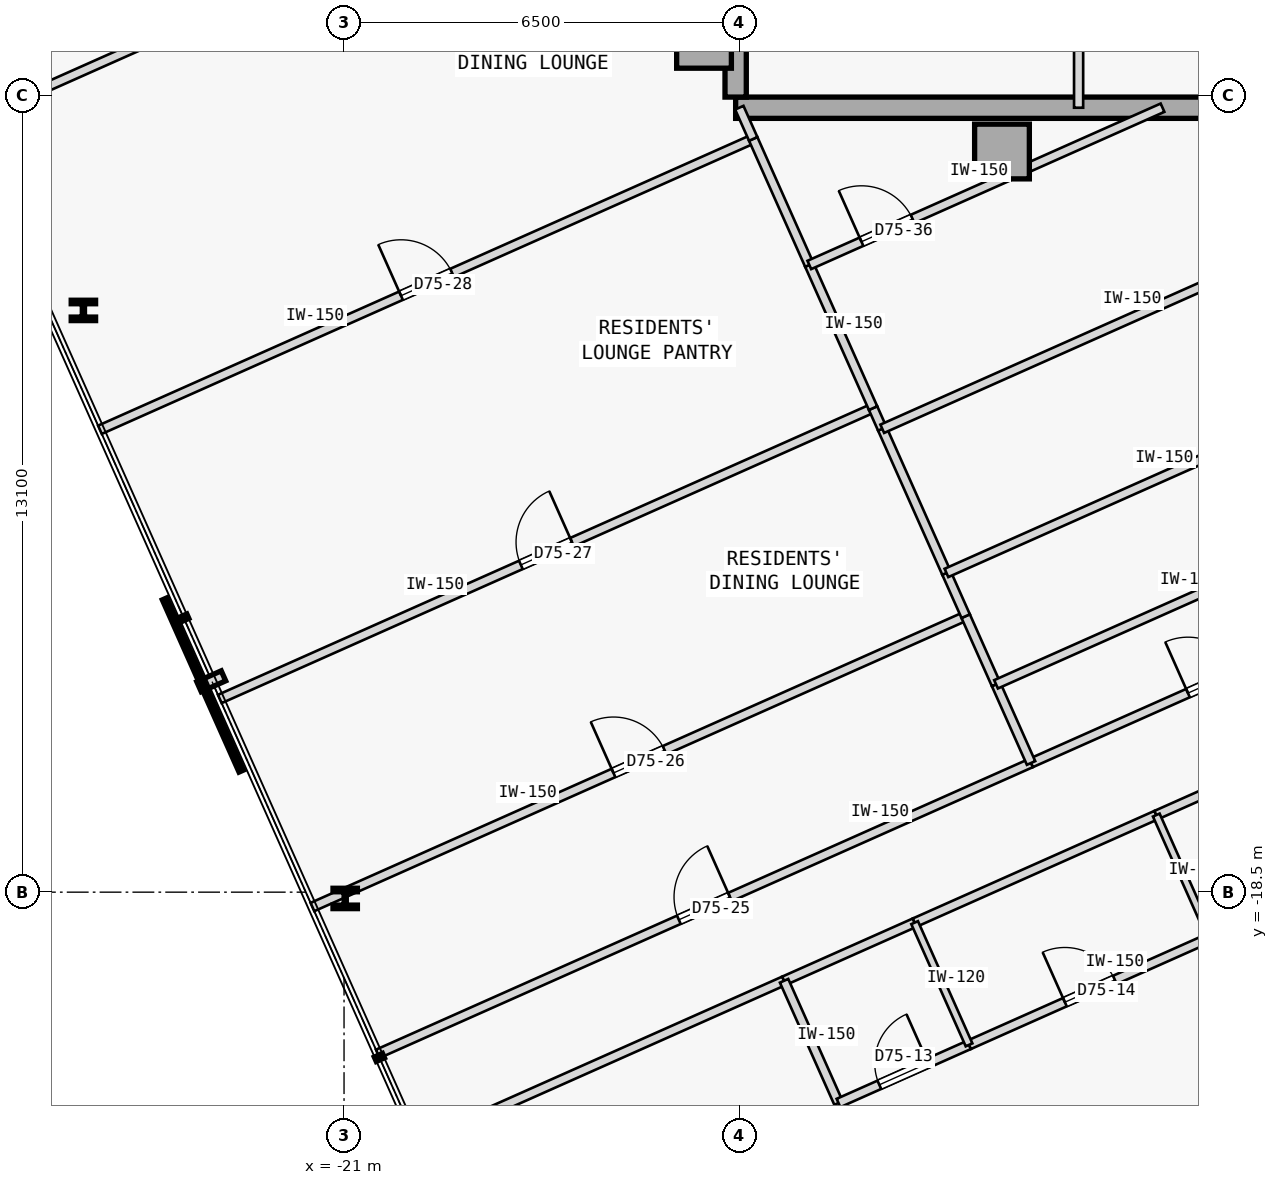
"""IFC4 building model, lengths in metres.
Left out: names, types, materials, properties, quantities, classifications, styles, units other than length and angle.
Written with IfcOpenShell. Run it as: python <this file> out.ifc"""

import sys

from ifc_helpers import new_model, si_unit, direction, frame, frame_2d, origin, origin_2d, place, context, subcontext, project, spatial, rectangle, i_section, extrude, element, fill, save


model = new_model("IFC4")
c1 = context("Model", 3, precision=1e-05, world=origin(), true_north=direction((0.0, 1.0)))
c2 = subcontext(c1, "Body", "Model", "MODEL_VIEW")
j1 = project(units=[si_unit("LENGTHUNIT", "METRE"), si_unit("PLANEANGLEUNIT", "RADIAN")], contexts=[c1])
p1 = place(None, origin())
s1 = spatial("IfcSite", under=j1, at=p1, CompositionType="ELEMENT")
p2 = place(p1, origin())
s2 = spatial("IfcBuilding", under=s1, at=p2, CompositionType="ELEMENT")
p3 = place(p2, frame((0.0, 0.0, 281.9)))
s3 = spatial("IfcBuildingStorey", under=s2, at=p3, CompositionType="ELEMENT", Elevation=281.9)
for number, where, z_axis, x_axis in (
    (1, (-15.08, -4.5, 0.0), (0.0, 0.0, 1.0), (1.0, 0.0, 0.0)),
    (2, (-10.18, -6.32, 0.0), (0.0, 0.0, 1.0), (1.0, 0.0, 0.0)),
):
    element("IfcColumn", number, at=place(p3, frame(where, z_axis=z_axis, x_axis=x_axis)), inside=s3, PredefinedType="COLUMN", context=c2, shape_type="SweptSolid", body=[
        extrude(rectangle(XDim=0.9, YDim=0.9, at=origin_2d()), origin(), (0.0, 0.0, 1.0), 3.35),
    ])
p4 = place(p3, frame((-14.56, -5.6, 0.0), z_axis=(0.0, 0.0, 1.0), x_axis=(1.0, 0.0, 0.0)))
e3 = element("IfcWall", 3, at=p4, inside=s3, PredefinedType="SHEAR", context=c2, shape_type="SweptSolid", body=[
    extrude(rectangle(XDim=10.86, YDim=0.35, at=frame_2d((5.43, 0.0))), origin(), (0.0, 0.0, 1.0), 3.125),
])
p5 = place(p3, frame((-14.56, -5.425, 0.0), z_axis=(0.0, 0.0, 1.0), x_axis=(0.0, 1.0, 0.0)))
e4 = element("IfcWall", 4, at=p5, inside=s3, PredefinedType="SHEAR", context=c2, shape_type="SweptSolid", body=[
    extrude(rectangle(XDim=10.85, YDim=0.35, at=frame_2d((5.425, 0.0))), origin(), (0.0, 0.0, 1.0), 3.125),
])
for number, where, z_axis, x_axis in (
    (5, (-25.286, -8.933, 0.0), (0.0, 0.0, 1.0), (1.0, 0.0, 0.0)),
    (6, (-20.981, -18.603, 0.0), (0.0, 0.0, 1.0), (1.0, 0.0, 0.0)),
):
    element("IfcColumn", number, at=place(p3, frame(where, z_axis=z_axis, x_axis=x_axis)), inside=s3, PredefinedType="COLUMN", context=c2, shape_type="SweptSolid", body=[
        extrude(i_section(OverallWidth=0.401, OverallDepth=0.335, WebThickness=0.036, FlangeThickness=0.058, FilletRadius=0.015, at=origin_2d()), origin(), (0.0, 0.0, 1.0), 3.35),
    ])
p6 = place(p3, frame((-8.92, -5.6, 0.0), z_axis=(0.0, 0.0, 1.0), x_axis=(0.0, 1.0, 0.0)))
e7 = element("IfcWall", 7, at=p6, inside=s3, PredefinedType="PARTITIONING", context=c2, shape_type="SweptSolid", body=[
    extrude(rectangle(XDim=2.65, YDim=0.15, at=frame_2d((1.325, 0.0))), origin(), (0.0, 0.0, 1.0), 3.125),
])
p7 = place(p3, frame((-19.786, -22.639, 0.0), z_axis=(0.0, 0.0, 1.0), x_axis=(0.913548717067, 0.406729322211, 0.0)))
e8 = element("IfcWall", 8, at=p7, inside=s3, PredefinedType="PARTITIONING", context=c2, shape_type="SweptSolid", body=[
    extrude(rectangle(XDim=6.593, YDim=0.15, at=frame_2d((3.297, 0.0))), origin(), (0.0, 0.0, 1.0), 3.125),
])
p8 = place(p3, frame((-13.763, -19.957, 0.0), z_axis=(0.0, 0.0, 1.0), x_axis=(0.913541436194, 0.406745675276, 0.0)))
e9 = element("IfcWall", 9, at=p8, inside=s3, PredefinedType="PARTITIONING", context=c2, shape_type="SweptSolid", body=[
    extrude(rectangle(XDim=2.35, YDim=0.15, at=frame_2d((1.175, 0.0))), origin(), (0.0, 0.0, 1.0), 3.125),
])
p9 = place(p3, frame((-11.616, -19.001, 0.0), z_axis=(0.0, 0.0, 1.0), x_axis=(0.913545193015, 0.406737237438, 0.0)))
e10 = element("IfcWall", 10, at=p9, inside=s3, PredefinedType="PARTITIONING", context=c2, shape_type="SweptSolid", body=[
    extrude(rectangle(XDim=4.35, YDim=0.15, at=frame_2d((2.175, 0.0))), origin(), (0.0, 0.0, 1.0), 3.125),
])
p10 = place(p3, frame((-7.643, -17.232, 0.0), z_axis=(0.0, 0.0, 1.0), x_axis=(0.913549606868, 0.406727323635, 0.0)))
e11 = element("IfcWall", 11, at=p10, inside=s3, PredefinedType="PARTITIONING", context=c2, shape_type="SweptSolid", body=[
    extrude(rectangle(XDim=3.5, YDim=0.15, at=frame_2d((1.75, 0.0))), origin(), (0.0, 0.0, 1.0), 3.125),
])
p11 = place(p3, frame((-20.445, -21.159, 0.0), z_axis=(0.0, 0.0, 1.0), x_axis=(0.913547681516, 0.406731648137, 0.0)))
e12 = element("IfcWall", 12, at=p11, inside=s3, PredefinedType="PARTITIONING", context=c2, shape_type="SweptSolid", body=[
    extrude(rectangle(XDim=11.76, YDim=0.15, at=frame_2d((5.88, 0.0))), origin(), (0.0, 0.0, 1.0), 3.125),
])
p12 = place(p11, frame((5.42, 0.0, 0.0)))
e13 = element("IfcOpeningElement", 13, at=p12, cuts=e12, PredefinedType="OPENING", context=c2, shape_type="SweptSolid", body=[
    extrude(rectangle(XDim=0.92, YDim=2.15, at=frame_2d((0.46, 1.075))), frame((0.0, 0.085, 0.0), z_axis=(0.0, -1.0, 0.0), x_axis=(1.0, 0.0, 0.0)), (0.0, 0.0, 1.0), 0.17),
])
p13 = place(p3, frame((-9.702, -16.375, 0.0), z_axis=(0.0, 0.0, 1.0), x_axis=(0.913552389019, 0.406721074594, 0.0)))
e14 = element("IfcWall", 14, at=p13, inside=s3, PredefinedType="PARTITIONING", context=c2, shape_type="SweptSolid", body=[
    extrude(rectangle(XDim=6.57, YDim=0.15, at=frame_2d((3.285, 0.0))), origin(), (0.0, 0.0, 1.0), 3.125),
])
p14 = place(p13, frame((2.825, 0.0, 0.0)))
e15 = element("IfcOpeningElement", 15, at=p14, cuts=e14, PredefinedType="OPENING", context=c2, shape_type="SweptSolid", body=[
    extrude(rectangle(XDim=0.92, YDim=2.15, at=frame_2d((0.46, 1.075))), frame((0.0, 0.085, 0.0), z_axis=(0.0, -1.0, 0.0), x_axis=(1.0, 0.0, 0.0)), (0.0, 0.0, 1.0), 0.17),
])
p15 = place(p3, frame((-12.868, -21.967, 0.0), z_axis=(0.0, 0.0, 1.0), x_axis=(-0.406725294076, 0.913550510459, 0.0)))
e16 = element("IfcWall", 16, at=p15, inside=s3, PredefinedType="PARTITIONING", context=c2, shape_type="SweptSolid", body=[
    extrude(rectangle(XDim=2.2, YDim=0.15, at=frame_2d((1.1, 0.0))), origin(), (0.0, 0.0, 1.0), 3.125),
])
p16 = place(p3, frame((-12.868, -21.967, 0.0), z_axis=(0.0, 0.0, 1.0), x_axis=(0.913541436194, 0.406745675276, 0.0)))
e17 = element("IfcWall", 17, at=p16, inside=s3, PredefinedType="PARTITIONING", context=c2, shape_type="SweptSolid", body=[
    extrude(rectangle(XDim=2.35, YDim=0.15, at=frame_2d((1.175, 0.0))), origin(), (0.0, 0.0, 1.0), 3.125),
])
p17 = place(p16, frame((0.735, 0.0, 0.0)))
e18 = element("IfcOpeningElement", 18, at=p17, cuts=e17, PredefinedType="OPENING", context=c2, shape_type="SweptSolid", body=[
    extrude(rectangle(XDim=0.88, YDim=2.15, at=frame_2d((0.44, 1.075))), frame((0.0, 0.085, 0.0), z_axis=(0.0, -1.0, 0.0), x_axis=(1.0, 0.0, 0.0)), (0.0, 0.0, 1.0), 0.17),
])
p18 = place(p3, frame((-10.722, -21.011, 0.0), z_axis=(0.0, 0.0, 1.0), x_axis=(0.913545193015, 0.406737237438, 0.0)))
e19 = element("IfcWall", 19, at=p18, inside=s3, PredefinedType="PARTITIONING", context=c2, shape_type="SweptSolid", body=[
    extrude(rectangle(XDim=4.35, YDim=0.15, at=frame_2d((2.175, 0.0))), origin(), (0.0, 0.0, 1.0), 3.125),
])
p19 = place(p18, frame((1.725, 0.0, 0.0)))
e20 = element("IfcOpeningElement", 20, at=p19, cuts=e19, PredefinedType="OPENING", context=c2, shape_type="SweptSolid", body=[
    extrude(rectangle(XDim=0.9, YDim=2.15, at=frame_2d((0.45, 1.075))), frame((0.0, 0.085, 0.0), z_axis=(0.0, -1.0, 0.0), x_axis=(1.0, 0.0, 0.0)), (0.0, 0.0, 1.0), 0.17),
])
for number, where, z_axis, x_axis in (
    (21, (-10.722, -21.011, 0.0), (0.0, 0.0, 1.0), (-0.407, 0.914, 0.0)),
    (22, (-6.748, -19.242, 0.0), (0.0, 0.0, 1.0), (-0.407, 0.914, 0.0)),
):
    element("IfcWall", number, at=place(p3, frame(where, z_axis=z_axis, x_axis=x_axis)), inside=s3, PredefinedType="PARTITIONING", context=c2, shape_type="SweptSolid", body=[
        extrude(rectangle(XDim=2.2, YDim=0.12, at=frame_2d((1.1, 0.0))), origin(), (0.0, 0.0, 1.0), 3.125),
    ])
p20 = place(p3, frame((-21.52, -18.744, 0.0), z_axis=(0.0, 0.0, 1.0), x_axis=(0.913539967617, 0.406748973651, 0.0)))
e23 = element("IfcWall", 23, at=p20, inside=s3, PredefinedType="PARTITIONING", context=c2, shape_type="SweptSolid", body=[
    extrude(rectangle(XDim=11.76, YDim=0.15, at=frame_2d((5.88, 0.0))), origin(), (0.0, 0.0, 1.0), 3.125),
])
p21 = place(p20, frame((5.42, 0.0, 0.0)))
e24 = element("IfcOpeningElement", 24, at=p21, cuts=e23, PredefinedType="OPENING", context=c2, shape_type="SweptSolid", body=[
    extrude(rectangle(XDim=0.92, YDim=2.15, at=frame_2d((0.46, 1.075))), frame((0.0, 0.085, 0.0), z_axis=(0.0, -1.0, 0.0), x_axis=(1.0, 0.0, 0.0)), (0.0, 0.0, 1.0), 0.17),
])
p22 = place(p3, frame((-9.702, -16.375, 0.0), z_axis=(0.0, 0.0, 1.0), x_axis=(-0.406762319034, 0.913534025537, 0.0)))
e25 = element("IfcWall", 25, at=p22, inside=s3, PredefinedType="PARTITIONING", context=c2, shape_type="SweptSolid", body=[
    extrude(rectangle(XDim=1.416, YDim=0.15, at=frame_2d((0.708, 0.0))), origin(), (0.0, 0.0, 1.0), 3.125),
])
p23 = place(p3, frame((-10.278, -15.082, 0.0), z_axis=(0.0, 0.0, 1.0), x_axis=(-0.406655262741, 0.913581686159, 0.0)))
e26 = element("IfcWall", 26, at=p23, inside=s3, PredefinedType="PARTITIONING", context=c2, shape_type="SweptSolid", body=[
    extrude(rectangle(XDim=1.227, YDim=0.15, at=frame_2d((0.614, 0.0))), origin(), (0.0, 0.0, 1.0), 3.125),
])
p24 = place(p3, frame((-23.043, -15.323, 0.0), z_axis=(0.0, 0.0, 1.0), x_axis=(0.913547681516, 0.406731648137, 0.0)))
e27 = element("IfcWall", 27, at=p24, inside=s3, PredefinedType="PARTITIONING", context=c2, shape_type="SweptSolid", body=[
    extrude(rectangle(XDim=11.76, YDim=0.15, at=frame_2d((5.88, 0.0))), origin(), (0.0, 0.0, 1.0), 3.125),
])
p25 = place(p24, frame((5.42, 0.0, 0.0)))
e28 = element("IfcOpeningElement", 28, at=p25, cuts=e27, PredefinedType="OPENING", context=c2, shape_type="SweptSolid", body=[
    extrude(rectangle(XDim=0.92, YDim=2.15, at=frame_2d((0.46, 1.075))), frame((0.0, 0.085, 0.0), z_axis=(0.0, -1.0, 0.0), x_axis=(1.0, 0.0, 0.0)), (0.0, 0.0, 1.0), 0.17),
])
p26 = place(p3, frame((-10.777, -13.961, 0.0), z_axis=(0.0, 0.0, 1.0), x_axis=(-0.406720744325, 0.913552536057, 0.0)))
e29 = element("IfcWall", 29, at=p26, inside=s3, PredefinedType="PARTITIONING", context=c2, shape_type="SweptSolid", body=[
    extrude(rectangle(XDim=0.778, YDim=0.15, at=frame_2d((0.389, 0.0))), origin(), (0.0, 0.0, 1.0), 3.125),
])
p27 = place(p3, frame((-11.093, -13.25, 0.0), z_axis=(0.0, 0.0, 1.0), x_axis=(-0.406723252866, 0.91355141923, 0.0)))
e30 = element("IfcWall", 30, at=p27, inside=s3, PredefinedType="PARTITIONING", context=c2, shape_type="SweptSolid", body=[
    extrude(rectangle(XDim=2.595, YDim=0.15, at=frame_2d((1.297, 0.0))), origin(), (0.0, 0.0, 1.0), 3.125),
])
p28 = place(p3, frame((-12.149, -10.88, 0.0), z_axis=(0.0, 0.0, 1.0), x_axis=(-0.406868995548, 0.913486519037, 0.0)))
e31 = element("IfcWall", 31, at=p28, inside=s3, PredefinedType="PARTITIONING", context=c2, shape_type="SweptSolid", body=[
    extrude(rectangle(XDim=0.372, YDim=0.15, at=frame_2d((0.186, 0.0))), origin(), (0.0, 0.0, 1.0), 3.125),
])
p29 = place(p3, frame((-25.014, -10.896, 0.0), z_axis=(0.0, 0.0, 1.0), x_axis=(0.913544247064, 0.406739362069, 0.0)))
e32 = element("IfcWall", 32, at=p29, inside=s3, PredefinedType="PARTITIONING", context=c2, shape_type="SweptSolid", body=[
    extrude(rectangle(XDim=11.76, YDim=0.15, at=frame_2d((5.88, 0.0))), origin(), (0.0, 0.0, 1.0), 3.125),
])
p30 = place(p29, frame((5.42, 0.0, 0.0)))
e33 = element("IfcOpeningElement", 33, at=p30, cuts=e32, PredefinedType="OPENING", context=c2, shape_type="SweptSolid", body=[
    extrude(rectangle(XDim=0.92, YDim=2.15, at=frame_2d((0.46, 1.075))), frame((0.0, 0.085, 0.0), z_axis=(0.0, -1.0, 0.0), x_axis=(1.0, 0.0, 0.0)), (0.0, 0.0, 1.0), 0.17),
])
p31 = place(p3, frame((-12.3, -10.54, 0.0), z_axis=(0.0, 0.0, 1.0), x_axis=(-0.406788806475, 0.913522231216, 0.0)))
e34 = element("IfcWall", 34, at=p31, inside=s3, PredefinedType="PARTITIONING", context=c2, shape_type="SweptSolid", body=[
    extrude(rectangle(XDim=2.577, YDim=0.15, at=frame_2d((1.289, 0.0))), origin(), (0.0, 0.0, 1.0), 3.125),
])
p32 = place(p3, frame((-13.348, -8.186, 0.0), z_axis=(0.0, 0.0, 1.0), x_axis=(-0.40673740295, 0.913545119324, 0.0)))
e35 = element("IfcWall", 35, at=p32, inside=s3, PredefinedType="PARTITIONING", context=c2, shape_type="SweptSolid", body=[
    extrude(rectangle(XDim=2.269, YDim=0.15, at=frame_2d((1.134, 0.0))), origin(), (0.0, 0.0, 1.0), 3.125),
])
p33 = place(p3, frame((-27.254, -5.865, 0.0), z_axis=(0.0, 0.0, 1.0), x_axis=(0.913547681516, 0.406731648137, 0.0)))
e36 = element("IfcWall", 36, at=p33, inside=s3, PredefinedType="PARTITIONING", context=c2, shape_type="SweptSolid", body=[
    extrude(rectangle(XDim=11.76, YDim=0.15, at=frame_2d((5.88, 0.0))), origin(), (0.0, 0.0, 1.0), 3.125),
])
p34 = place(p3, frame((-14.271, -6.113, 0.0), z_axis=(0.0, 0.0, 1.0), x_axis=(-0.406622099206, 0.913596447255, 0.0)))
e37 = element("IfcWall", 37, at=p34, inside=s3, PredefinedType="PARTITIONING", context=c2, shape_type="SweptSolid", body=[
    extrude(rectangle(XDim=0.562, YDim=0.15, at=frame_2d((0.281, 0.0))), origin(), (0.0, 0.0, 1.0), 3.125),
])
p35 = place(p3, frame((-10.278, -15.082, 0.0), z_axis=(0.0, 0.0, 1.0), x_axis=(0.913549882956, 0.406726703513, 0.0)))
e38 = element("IfcWall", 38, at=p35, inside=s3, PredefinedType="PARTITIONING", context=c2, shape_type="SweptSolid", body=[
    extrude(rectangle(XDim=7.2, YDim=0.15, at=frame_2d((3.6, 0.0))), origin(), (0.0, 0.0, 1.0), 3.125),
])
p36 = place(p3, frame((-11.093, -13.25, 0.0), z_axis=(0.0, 0.0, 1.0), x_axis=(0.913543891457, 0.406740160767, 0.0)))
e39 = element("IfcWall", 39, at=p36, inside=s3, PredefinedType="PARTITIONING", context=c2, shape_type="SweptSolid", body=[
    extrude(rectangle(XDim=8.093, YDim=0.15, at=frame_2d((4.046, 0.0))), origin(), (0.0, 0.0, 1.0), 3.125),
])
p37 = place(p3, frame((-12.149, -10.88, 0.0), z_axis=(0.0, 0.0, 1.0), x_axis=(0.913542450291, 0.406743397631, 0.0)))
e40 = element("IfcWall", 40, at=p37, inside=s3, PredefinedType="PARTITIONING", context=c2, shape_type="SweptSolid", body=[
    extrude(rectangle(XDim=9.248, YDim=0.15, at=frame_2d((4.624, 0.0))), origin(), (0.0, 0.0, 1.0), 3.125),
])
p38 = place(p3, frame((-13.348, -8.186, 0.0), z_axis=(0.0, 0.0, 1.0), x_axis=(0.913551673432, 0.406722681896, 0.0)))
e41 = element("IfcWall", 41, at=p38, inside=s3, PredefinedType="PARTITIONING", context=c2, shape_type="SweptSolid", body=[
    extrude(rectangle(XDim=6.358, YDim=0.15, at=frame_2d((3.179, 0.0))), origin(), (0.0, 0.0, 1.0), 3.125),
])
p39 = place(p38, frame((0.939, 0.0, 0.0)))
e42 = element("IfcOpeningElement", 42, at=p39, cuts=e41, PredefinedType="OPENING", context=c2, shape_type="SweptSolid", body=[
    extrude(rectangle(XDim=0.92, YDim=2.15, at=frame_2d((0.46, 1.075))), frame((0.0, 0.085, 0.0), z_axis=(0.0, -1.0, 0.0), x_axis=(1.0, 0.0, 0.0)), (0.0, 0.0, 1.0), 0.17),
])
p40 = place(p17, origin())
e43 = element("IfcDoor", 43, at=p40, inside=s3, OperationType="SINGLE_SWING_RIGHT", PredefinedType="DOOR", context=c2, shape_type="SweptSolid", body=[
    extrude(rectangle(XDim=0.88, YDim=2.15, at=frame_2d((0.44, 1.075))), frame((0.0, 0.025, 0.0), z_axis=(0.0, -1.0, 0.0), x_axis=(1.0, 0.0, 0.0)), (0.0, 0.0, 1.0), 0.05),
])
fill(e18, e43)
p41 = place(p19, origin())
e44 = element("IfcDoor", 44, at=p41, inside=s3, OperationType="SINGLE_SWING_LEFT", PredefinedType="DOOR", context=c2, shape_type="SweptSolid", body=[
    extrude(rectangle(XDim=0.9, YDim=2.15, at=frame_2d((0.45, 1.075))), frame((0.0, 0.025, 0.0), z_axis=(0.0, -1.0, 0.0), x_axis=(1.0, 0.0, 0.0)), (0.0, 0.0, 1.0), 0.05),
])
fill(e20, e44)
p42 = place(p12, origin())
e45 = element("IfcDoor", 45, at=p42, inside=s3, OperationType="SINGLE_SWING_RIGHT", PredefinedType="DOOR", context=c2, shape_type="SweptSolid", body=[
    extrude(rectangle(XDim=0.92, YDim=2.15, at=frame_2d((0.46, 1.075))), frame((0.0, 0.025, 0.0), z_axis=(0.0, -1.0, 0.0), x_axis=(1.0, 0.0, 0.0)), (0.0, 0.0, 1.0), 0.05),
])
fill(e13, e45)
p43 = place(p21, origin())
e46 = element("IfcDoor", 46, at=p43, inside=s3, OperationType="SINGLE_SWING_LEFT", PredefinedType="DOOR", context=c2, shape_type="SweptSolid", body=[
    extrude(rectangle(XDim=0.92, YDim=2.15, at=frame_2d((0.46, 1.075))), frame((0.0, 0.025, 0.0), z_axis=(0.0, -1.0, 0.0), x_axis=(1.0, 0.0, 0.0)), (0.0, 0.0, 1.0), 0.05),
])
fill(e24, e46)
p44 = place(p25, origin())
e47 = element("IfcDoor", 47, at=p44, inside=s3, OperationType="SINGLE_SWING_RIGHT", PredefinedType="DOOR", context=c2, shape_type="SweptSolid", body=[
    extrude(rectangle(XDim=0.92, YDim=2.15, at=frame_2d((0.46, 1.075))), frame((0.0, 0.025, 0.0), z_axis=(0.0, -1.0, 0.0), x_axis=(1.0, 0.0, 0.0)), (0.0, 0.0, 1.0), 0.05),
])
fill(e28, e47)
p45 = place(p30, origin())
e48 = element("IfcDoor", 48, at=p45, inside=s3, OperationType="SINGLE_SWING_LEFT", PredefinedType="DOOR", context=c2, shape_type="SweptSolid", body=[
    extrude(rectangle(XDim=0.92, YDim=2.15, at=frame_2d((0.46, 1.075))), frame((0.0, 0.025, 0.0), z_axis=(0.0, -1.0, 0.0), x_axis=(1.0, 0.0, 0.0)), (0.0, 0.0, 1.0), 0.05),
])
fill(e33, e48)
p46 = place(p14, origin())
e49 = element("IfcDoor", 49, at=p46, inside=s3, OperationType="SINGLE_SWING_LEFT", PredefinedType="DOOR", context=c2, shape_type="SweptSolid", body=[
    extrude(rectangle(XDim=0.92, YDim=2.15, at=frame_2d((0.46, 1.075))), frame((0.0, 0.025, 0.0), z_axis=(0.0, -1.0, 0.0), x_axis=(1.0, 0.0, 0.0)), (0.0, 0.0, 1.0), 0.05),
])
fill(e15, e49)
p47 = place(p39, origin())
e50 = element("IfcDoor", 50, at=p47, inside=s3, OperationType="SINGLE_SWING_LEFT", PredefinedType="DOOR", context=c2, shape_type="SweptSolid", body=[
    extrude(rectangle(XDim=0.92, YDim=2.15, at=frame_2d((0.46, 1.075))), frame((0.0, 0.025, 0.0), z_axis=(0.0, -1.0, 0.0), x_axis=(1.0, 0.0, 0.0)), (0.0, 0.0, 1.0), 0.05),
])
fill(e42, e50)
save(model, sys.argv[1])
